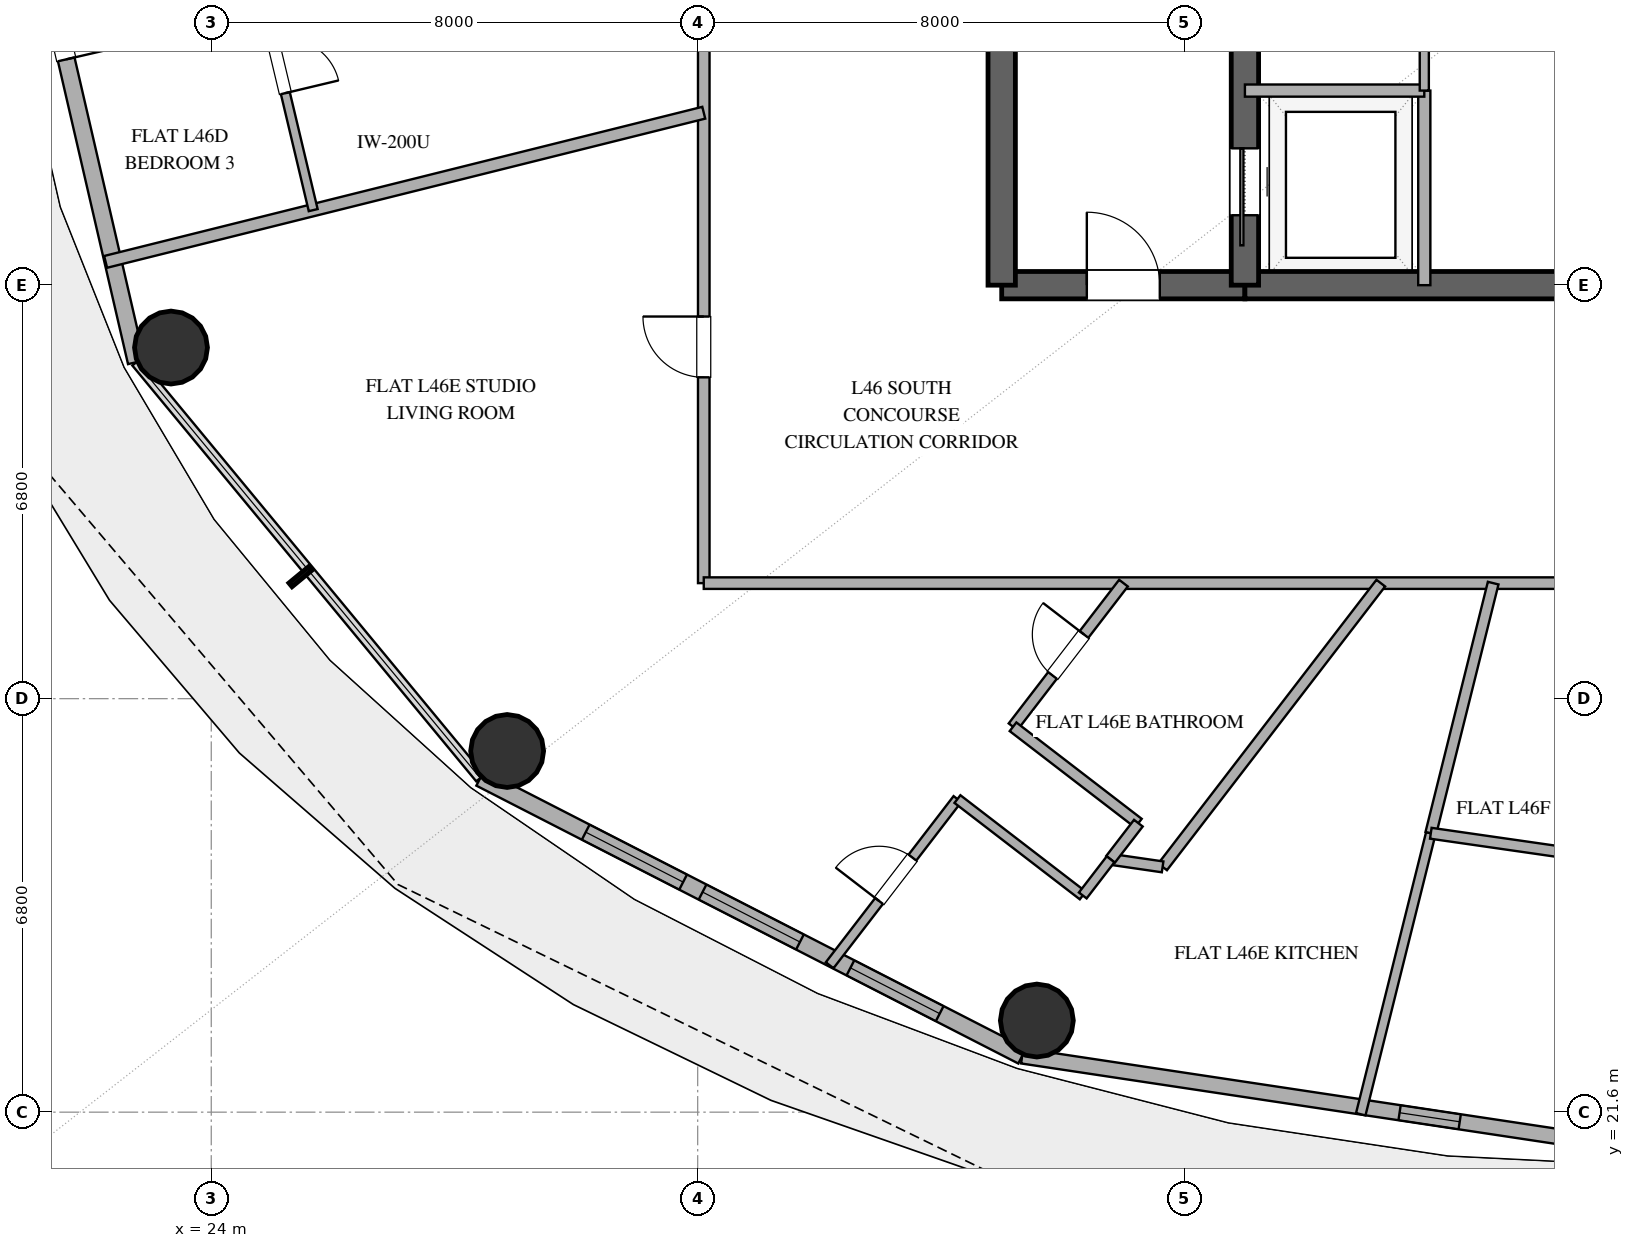
"""IFC4 building model, lengths in metres.
Left out: names, types, materials, properties, quantities, classifications, styles, units other than length and angle.
Written with IfcOpenShell. Run it as: python <this file> out.ifc"""

import sys

from ifc_helpers import new_model, si_unit, direction, frame, frame_2d, origin, origin_2d, place, context, subcontext, project, spatial, rectangle, hollow_circle, extrude, element, fill, save


model = new_model("IFC4")
c1 = context("Model", 3, precision=1e-05, world=origin(), true_north=direction((0.0, 1.0)))
c2 = subcontext(c1, "Body", "Model", "MODEL_VIEW")
j1 = project(units=[si_unit("LENGTHUNIT", "METRE"), si_unit("PLANEANGLEUNIT", "RADIAN")], contexts=[c1])
p1 = place(None, origin())
s1 = spatial("IfcSite", under=j1, at=p1, CompositionType="ELEMENT")
p2 = place(p1, origin())
s2 = spatial("IfcBuilding", under=s1, at=p2, CompositionType="ELEMENT")
p3 = place(p2, frame((0.0, 0.0, 183.0)))
s3 = spatial("IfcBuildingStorey", under=s2, at=p3, CompositionType="ELEMENT", Elevation=183.0)
p4 = place(p3, frame((37.0, 35.2, 0.0), z_axis=(0.0, 0.0, 1.0), x_axis=(1.0, 0.0, 0.0)))
e1 = element("IfcWall", 1, at=p4, inside=s3, PredefinedType="SHEAR", context=c2, shape_type="SweptSolid", body=[
    extrude(rectangle(XDim=4.0, YDim=0.45, at=frame_2d((2.0, 0.0))), origin(), (0.0, 0.0, 1.0), 3.38),
])
p5 = place(p4, frame((1.4, 0.0, 0.0)))
e2 = element("IfcOpeningElement", 2, at=p5, cuts=e1, PredefinedType="OPENING", context=c2, shape_type="SweptSolid", body=[
    extrude(rectangle(XDim=1.2, YDim=2.15, at=frame_2d((0.6, 1.075))), frame((0.0, 0.235, 0.0), z_axis=(0.0, -1.0, 0.0), x_axis=(1.0, 0.0, 0.0)), (0.0, 0.0, 1.0), 0.47),
])
p6 = place(p3, frame((41.0, 35.2, 0.0), z_axis=(0.0, 0.0, 1.0), x_axis=(1.0, 0.0, 0.0)))
e3 = element("IfcWall", 3, at=p6, inside=s3, PredefinedType="SHEAR", context=c2, shape_type="SweptSolid", body=[
    extrude(rectangle(XDim=14.0, YDim=0.45, at=frame_2d((7.0, 0.0))), origin(), (0.0, 0.0, 1.0), 3.38),
])
p7 = place(p6, frame((6.1, 0.0, 0.0)))
e4 = element("IfcOpeningElement", 4, at=p7, cuts=e3, PredefinedType="OPENING", context=c2, shape_type="SweptSolid", body=[
    extrude(rectangle(XDim=1.8, YDim=2.25, at=frame_2d((0.9, 1.125))), frame((0.0, 0.235, 0.0), z_axis=(0.0, -1.0, 0.0), x_axis=(1.0, 0.0, 0.0)), (0.0, 0.0, 1.0), 0.47),
])
p8 = place(p3, frame((37.0, 35.2, 0.0), z_axis=(0.0, 0.0, 1.0), x_axis=(0.0, 1.0, 0.0)))
e5 = element("IfcWall", 5, at=p8, inside=s3, PredefinedType="SHEAR", context=c2, shape_type="SweptSolid", body=[
    extrude(rectangle(XDim=13.6, YDim=0.45, at=frame_2d((6.8, 0.0))), origin(), (0.0, 0.0, 1.0), 3.38),
])
p9 = place(p3, frame((41.0, 35.2, 0.0), z_axis=(0.0, 0.0, 1.0), x_axis=(0.0, 1.0, 0.0)))
e6 = element("IfcWall", 6, at=p9, inside=s3, PredefinedType="SHEAR", context=c2, shape_type="SweptSolid", body=[
    extrude(rectangle(XDim=13.6, YDim=0.45, at=frame_2d((6.8, 0.0))), origin(), (0.0, 0.0, 1.0), 3.38),
])
p10 = place(p9, frame((1.15, 0.0, 0.0)))
e7 = element("IfcOpeningElement", 7, at=p10, cuts=e6, PredefinedType="OPENING", context=c2, shape_type="SweptSolid", body=[
    extrude(rectangle(XDim=1.1, YDim=2.2, at=frame_2d((0.55, 1.1))), frame((0.0, 0.235, 0.0), z_axis=(0.0, -1.0, 0.0), x_axis=(1.0, 0.0, 0.0)), (0.0, 0.0, 1.0), 0.47),
])
for number, where, z_axis, x_axis in (
    (8, (23.338, 34.174, 0.0), (0.0, 0.0, 1.0), (1.0, 0.0, 0.0)),
    (9, (28.866, 27.54, 0.0), (0.0, 0.0, 1.0), (1.0, 0.0, 0.0)),
    (10, (37.578, 23.107, 0.0), (0.0, 0.0, 1.0), (1.0, 0.0, 0.0)),
):
    element("IfcColumn", number, at=place(p3, frame(where, z_axis=z_axis, x_axis=x_axis)), inside=s3, PredefinedType="COLUMN", context=c2, shape_type="SweptSolid", body=[
        extrude(hollow_circle(Radius=0.6, WallThickness=0.032, at=origin_2d()), origin(), (0.0, 0.0, 1.0), 3.38),
    ])
p11 = place(p3, frame((20.901, 42.0, 0.0), z_axis=(0.0, 0.0, 1.0), x_axis=(0.225473184558, -0.974249374157, 0.0)))
e11 = element("IfcWall", 11, at=p11, inside=s3, PredefinedType="SOLIDWALL", context=c2, shape_type="SweptSolid", body=[
    extrude(rectangle(XDim=8.28, YDim=0.28, at=frame_2d((4.14, 0.0))), origin(), (0.0, 0.0, 1.0), 3.38),
])
p12 = place(p11, frame((1.568, 0.0, 0.0)))
e12 = element("IfcOpeningElement", 12, at=p12, cuts=e11, PredefinedType="OPENING", context=c2, shape_type="SweptSolid", body=[
    extrude(rectangle(XDim=1.6, YDim=2.25, at=frame_2d((0.8, 1.125))), frame((0.0, 0.15, 0.0), z_axis=(0.0, -1.0, 0.0), x_axis=(1.0, 0.0, 0.0)), (0.0, 0.0, 1.0), 0.3),
])
p13 = place(p3, frame((28.424, 27.094, 0.0), z_axis=(0.0, 0.0, 1.0), x_axis=(0.889872523182, -0.456209263919, 0.0)))
e13 = element("IfcWall", 13, at=p13, inside=s3, PredefinedType="SOLIDWALL", context=c2, shape_type="SweptSolid", body=[
    extrude(rectangle(XDim=10.016, YDim=0.28, at=frame_2d((5.008, 0.0))), origin(), (0.0, 0.0, 1.0), 3.38),
])
p14 = place(p13, frame((1.95, 0.0, 0.85)))
e14 = element("IfcOpeningElement", 14, at=p14, cuts=e13, PredefinedType="OPENING", context=c2, shape_type="SweptSolid", body=[
    extrude(rectangle(XDim=1.8, YDim=2.2, at=frame_2d((0.9, 1.1))), frame((0.0, 0.15, 0.0), z_axis=(0.0, -1.0, 0.0), x_axis=(1.0, 0.0, 0.0)), (0.0, 0.0, 1.0), 0.3),
])
p15 = place(p13, frame((4.109, 0.0, 0.85)))
e15 = element("IfcOpeningElement", 15, at=p15, cuts=e13, PredefinedType="OPENING", context=c2, shape_type="SweptSolid", body=[
    extrude(rectangle(XDim=1.8, YDim=2.2, at=frame_2d((0.9, 1.1))), frame((0.0, 0.15, 0.0), z_axis=(0.0, -1.0, 0.0), x_axis=(1.0, 0.0, 0.0)), (0.0, 0.0, 1.0), 0.3),
])
p16 = place(p13, frame((6.842, 0.0, 0.85)))
e16 = element("IfcOpeningElement", 16, at=p16, cuts=e13, PredefinedType="OPENING", context=c2, shape_type="SweptSolid", body=[
    extrude(rectangle(XDim=1.65, YDim=2.0, at=frame_2d((0.825, 1.0))), frame((0.0, 0.15, 0.0), z_axis=(0.0, -1.0, 0.0), x_axis=(1.0, 0.0, 0.0)), (0.0, 0.0, 1.0), 0.3),
])
p17 = place(p3, frame((37.337, 22.525, 0.0), z_axis=(0.0, 0.0, 1.0), x_axis=(0.988863993413, -0.148822049884, 0.0)))
e17 = element("IfcWall", 17, at=p17, inside=s3, PredefinedType="SOLIDWALL", context=c2, shape_type="SweptSolid", body=[
    extrude(rectangle(XDim=10.783, YDim=0.25, at=frame_2d((5.392, 0.0))), origin(), (0.0, 0.0, 1.0), 3.38),
])
p18 = place(p17, frame((6.276, 0.0, 0.35)))
e18 = element("IfcOpeningElement", 18, at=p18, cuts=e17, PredefinedType="OPENING", context=c2, shape_type="SweptSolid", body=[
    extrude(rectangle(XDim=1.0, YDim=1.05, at=frame_2d((0.5, 0.525))), frame((0.0, 0.135, 0.0), z_axis=(0.0, -1.0, 0.0), x_axis=(1.0, 0.0, 0.0)), (0.0, 0.0, 1.0), 0.27),
])
p19 = place(p3, frame((43.95, 35.2, 0.0), z_axis=(0.0, 0.0, 1.0), x_axis=(0.0, 1.0, 0.0)))
e19 = element("IfcWall", 19, at=p19, inside=s3, PredefinedType="SOLIDWALL", context=c2, shape_type="SweptSolid", body=[
    extrude(rectangle(XDim=3.2, YDim=0.2, at=frame_2d((1.6, 0.0))), origin(), (0.0, 0.0, 1.0), 2.74),
])
p20 = place(p3, frame((41.0, 38.4, 0.0), z_axis=(0.0, 0.0, 1.0), x_axis=(1.0, 0.0, 0.0)))
e20 = element("IfcWall", 20, at=p20, inside=s3, PredefinedType="SOLIDWALL", context=c2, shape_type="SweptSolid", body=[
    extrude(rectangle(XDim=2.95, YDim=0.2, at=frame_2d((1.475, 0.0))), origin(), (0.0, 0.0, 1.0), 2.74),
])
p21 = place(p3, frame((43.95, 38.4, 0.0), z_axis=(0.0, 0.0, 1.0), x_axis=(0.0, 1.0, 0.0)))
e21 = element("IfcWall", 21, at=p21, inside=s3, PredefinedType="PARTITIONING", context=c2, shape_type="SweptSolid", body=[
    extrude(rectangle(XDim=5.18, YDim=0.15, at=frame_2d((2.59, 0.0))), origin(), (0.0, 0.0, 1.0), 2.74),
])
p22 = place(p21, frame((2.1, 0.0, 0.0)))
e22 = element("IfcOpeningElement", 22, at=p22, cuts=e21, PredefinedType="OPENING", context=c2, shape_type="SweptSolid", body=[
    extrude(rectangle(XDim=0.9, YDim=2.15, at=frame_2d((0.45, 1.075))), frame((0.0, 0.085, 0.0), z_axis=(0.0, -1.0, 0.0), x_axis=(1.0, 0.0, 0.0)), (0.0, 0.0, 1.0), 0.17),
])
p23 = place(p3, frame((32.1, 30.3, 0.0), z_axis=(0.0, 0.0, 1.0), x_axis=(0.0, 1.0, 0.0)))
e23 = element("IfcWall", 23, at=p23, inside=s3, PredefinedType="PARTITIONING", context=c2, shape_type="SweptSolid", body=[
    extrude(rectangle(XDim=12.53, YDim=0.19, at=frame_2d((6.265, 0.0))), origin(), (0.0, 0.0, 1.0), 2.74),
])
p24 = place(p23, frame((3.384, 0.0, 0.0)))
e24 = element("IfcOpeningElement", 24, at=p24, cuts=e23, PredefinedType="OPENING", context=c2, shape_type="SweptSolid", body=[
    extrude(rectangle(XDim=1.0, YDim=2.2, at=frame_2d((0.5, 1.1))), frame((0.0, 0.105, 0.0), z_axis=(0.0, -1.0, 0.0), x_axis=(1.0, 0.0, 0.0)), (0.0, 0.0, 1.0), 0.21),
])
p25 = place(p3, frame((46.818, 30.3, 0.0), z_axis=(0.0, 0.0, 1.0), x_axis=(-1.0, 0.0, 0.0)))
e25 = element("IfcWall", 25, at=p25, inside=s3, PredefinedType="PARTITIONING", context=c2, shape_type="SweptSolid", body=[
    extrude(rectangle(XDim=14.718, YDim=0.19, at=frame_2d((7.359, 0.0))), origin(), (0.0, 0.0, 1.0), 2.74),
])
p26 = place(p3, frame((22.263, 35.583, 0.0), z_axis=(0.0, 0.0, 1.0), x_axis=(0.970298114693, 0.241912315983, 0.0)))
e26 = element("IfcWall", 26, at=p26, inside=s3, PredefinedType="PARTITIONING", context=c2, shape_type="SweptSolid", body=[
    extrude(rectangle(XDim=10.138, YDim=0.2, at=frame_2d((5.069, 0.0))), origin(), (0.0, 0.0, 1.0), 2.74),
])
p27 = place(p3, frame((39.646, 25.634, 0.0), z_axis=(0.0, 0.0, 1.0), x_axis=(0.609572446913, 0.792730365234, 0.0)))
e27 = element("IfcWall", 27, at=p27, inside=s3, PredefinedType="PLUMBINGWALL", context=c2, shape_type="SweptSolid", body=[
    extrude(rectangle(XDim=5.886, YDim=0.18, at=frame_2d((2.943, 0.0))), origin(), (0.0, 0.0, 1.0), 2.74),
])
p28 = place(p3, frame((24.552, 41.158, 0.0), z_axis=(0.0, 0.0, 1.0), x_axis=(0.231625058686, -0.972805135774, 0.0)))
e28 = element("IfcWall", 28, at=p28, inside=s3, PredefinedType="PARTITIONING", context=c2, shape_type="SweptSolid", body=[
    extrude(rectangle(XDim=4.856, YDim=0.15, at=frame_2d((2.428, 0.0))), origin(), (0.0, 0.0, 1.0), 2.74),
])
p29 = place(p28, frame((1.978, 0.0, 0.0)))
e29 = element("IfcOpeningElement", 29, at=p29, cuts=e28, PredefinedType="OPENING", context=c2, shape_type="SweptSolid", body=[
    extrude(rectangle(XDim=0.9, YDim=2.1, at=frame_2d((0.45, 1.05))), frame((0.0, 0.085, 0.0), z_axis=(0.0, -1.0, 0.0), x_axis=(1.0, 0.0, 0.0)), (0.0, 0.0, 1.0), 0.17),
])
p30 = place(p3, frame((42.905, 21.566, 0.0), z_axis=(0.0, 0.0, 1.0), x_axis=(0.24192039409, 0.970296100643, 0.0)))
e30 = element("IfcWall", 30, at=p30, inside=s3, PredefinedType="PLUMBINGWALL", context=c2, shape_type="SweptSolid", body=[
    extrude(rectangle(XDim=4.762, YDim=0.16, at=frame_2d((2.381, 0.0))), origin(), (0.0, 0.0, 1.0), 2.74),
])
p31 = place(p3, frame((44.057, 26.187, 0.0), z_axis=(0.0, 0.0, 1.0), x_axis=(0.241939344098, 0.97029137571, 0.0)))
e31 = element("IfcWall", 31, at=p31, inside=s3, PredefinedType="PLUMBINGWALL", context=c2, shape_type="SweptSolid", body=[
    extrude(rectangle(XDim=4.239, YDim=0.18, at=frame_2d((2.12, 0.0))), origin(), (0.0, 0.0, 1.0), 2.74),
])
p32 = place(p3, frame((48.0, 25.62, 0.0), z_axis=(0.0, 0.0, 1.0), x_axis=(-0.989829001183, 0.14226225226, 0.0)))
e32 = element("IfcWall", 32, at=p32, inside=s3, PredefinedType="PLUMBINGWALL", context=c2, shape_type="SweptSolid", body=[
    extrude(rectangle(XDim=3.983, YDim=0.18, at=frame_2d((1.992, 0.0))), origin(), (0.0, 0.0, 1.0), 2.74),
])
p33 = place(p3, frame((34.17, 24.016, 0.0), z_axis=(0.0, 0.0, 1.0), x_axis=(0.609597828201, 0.792710847568, 0.0)))
e33 = element("IfcWall", 33, at=p33, inside=s3, PredefinedType="PLUMBINGWALL", context=c2, shape_type="SweptSolid", body=[
    extrude(rectangle(XDim=3.448, YDim=0.16, at=frame_2d((1.724, 0.0))), origin(), (0.0, 0.0, 1.0), 2.74),
])
p34 = place(p33, frame((1.334, 0.0, 0.0)))
e34 = element("IfcOpeningElement", 34, at=p34, cuts=e33, PredefinedType="OPENING", context=c2, shape_type="SweptSolid", body=[
    extrude(rectangle(XDim=0.9, YDim=2.1, at=frame_2d((0.45, 1.05))), frame((0.0, 0.09, 0.0), z_axis=(0.0, -1.0, 0.0), x_axis=(1.0, 0.0, 0.0)), (0.0, 0.0, 1.0), 0.18),
])
p35 = place(p3, frame((37.186, 27.938, 0.0), z_axis=(0.0, 0.0, 1.0), x_axis=(0.609591964346, 0.792715356862, 0.0)))
e35 = element("IfcWall", 35, at=p35, inside=s3, PredefinedType="PLUMBINGWALL", context=c2, shape_type="SweptSolid", body=[
    extrude(rectangle(XDim=2.98, YDim=0.18, at=frame_2d((1.49, 0.0))), origin(), (0.0, 0.0, 1.0), 2.74),
])
p36 = place(p35, frame((1.065, 0.0, 0.0)))
e36 = element("IfcOpeningElement", 36, at=p36, cuts=e35, PredefinedType="OPENING", context=c2, shape_type="SweptSolid", body=[
    extrude(rectangle(XDim=0.85, YDim=2.1, at=frame_2d((0.425, 1.05))), frame((0.0, 0.1, 0.0), z_axis=(0.0, -1.0, 0.0), x_axis=(1.0, 0.0, 0.0)), (0.0, 0.0, 1.0), 0.2),
])
p37 = place(p3, frame((39.248, 26.353, 0.0), z_axis=(0.0, 0.0, 1.0), x_axis=(-0.792732166763, 0.609570104073, 0.0)))
e37 = element("IfcWall", 37, at=p37, inside=s3, PredefinedType="PLUMBINGWALL", context=c2, shape_type="SweptSolid", body=[
    extrude(rectangle(XDim=2.601, YDim=0.18, at=frame_2d((1.3, 0.0))), origin(), (0.0, 0.0, 1.0), 2.74),
])
p38 = place(p3, frame((36.272, 26.749, 0.0), z_axis=(0.0, 0.0, 1.0), x_axis=(0.792742649864, -0.609556470794, 0.0)))
e38 = element("IfcWall", 38, at=p38, inside=s3, PredefinedType="PLUMBINGWALL", context=c2, shape_type="SweptSolid", body=[
    extrude(rectangle(XDim=2.6, YDim=0.16, at=frame_2d((1.3, 0.0))), origin(), (0.0, 0.0, 1.0), 2.74),
])
p39 = place(p3, frame((38.791, 25.758, 0.0), z_axis=(0.0, 0.0, 1.0), x_axis=(0.989584977247, -0.143949896861, 0.0)))
e39 = element("IfcWall", 39, at=p39, inside=s3, PredefinedType="PLUMBINGWALL", context=c2, shape_type="SweptSolid", body=[
    extrude(rectangle(XDim=0.865, YDim=0.18, at=frame_2d((0.433, 0.0))), origin(), (0.0, 0.0, 1.0), 2.74),
])
p40 = place(p3, frame((38.791, 25.758, 0.0), z_axis=(0.0, 0.0, 1.0), x_axis=(0.609695029381, 0.792636089986, 0.0)))
e40 = element("IfcWall", 40, at=p40, inside=s3, PredefinedType="PLUMBINGWALL", context=c2, shape_type="SweptSolid", body=[
    extrude(rectangle(XDim=0.75, YDim=0.18, at=frame_2d((0.375, 0.0))), origin(), (0.0, 0.0, 1.0), 2.74),
])
p41 = place(p3, frame((38.333, 25.164, 0.0), z_axis=(0.0, 0.0, 1.0), x_axis=(0.609695029381, 0.792636089986, 0.0)))
e41 = element("IfcWall", 41, at=p41, inside=s3, PredefinedType="PLUMBINGWALL", context=c2, shape_type="SweptSolid", body=[
    extrude(rectangle(XDim=0.75, YDim=0.16, at=frame_2d((0.375, 0.0))), origin(), (0.0, 0.0, 1.0), 2.74),
])
p42 = place(p12, origin())
e42 = element("IfcDoor", 42, at=p42, inside=s3, OperationType="DOUBLE_DOOR_SINGLE_SWING", PredefinedType="DOOR", context=c2, shape_type="SweptSolid", body=[
    extrude(rectangle(XDim=1.6, YDim=2.25, at=frame_2d((0.8, 1.125))), frame((0.0, 0.025, 0.0), z_axis=(0.0, -1.0, 0.0), x_axis=(1.0, 0.0, 0.0)), (0.0, 0.0, 1.0), 0.05),
])
fill(e12, e42)
p43 = place(p14, origin())
e43 = element("IfcWindow", 43, at=p43, inside=s3, PartitioningType="SINGLE_PANEL", PredefinedType="WINDOW", context=c2, shape_type="SweptSolid", body=[
    extrude(rectangle(XDim=1.8, YDim=2.2, at=frame_2d((0.9, 1.1))), frame((0.0, 0.03, 0.0), z_axis=(0.0, -1.0, 0.0), x_axis=(1.0, 0.0, 0.0)), (0.0, 0.0, 1.0), 0.06),
])
fill(e14, e43)
p44 = place(p15, origin())
e44 = element("IfcWindow", 44, at=p44, inside=s3, PartitioningType="SINGLE_PANEL", PredefinedType="WINDOW", context=c2, shape_type="SweptSolid", body=[
    extrude(rectangle(XDim=1.8, YDim=2.2, at=frame_2d((0.9, 1.1))), frame((0.0, 0.03, 0.0), z_axis=(0.0, -1.0, 0.0), x_axis=(1.0, 0.0, 0.0)), (0.0, 0.0, 1.0), 0.06),
])
fill(e15, e44)
p45 = place(p16, origin())
e45 = element("IfcWindow", 45, at=p45, inside=s3, PartitioningType="SINGLE_PANEL", PredefinedType="WINDOW", context=c2, shape_type="SweptSolid", body=[
    extrude(rectangle(XDim=1.65, YDim=2.0, at=frame_2d((0.825, 1.0))), frame((0.0, 0.03, 0.0), z_axis=(0.0, -1.0, 0.0), x_axis=(1.0, 0.0, 0.0)), (0.0, 0.0, 1.0), 0.06),
])
fill(e16, e45)
p46 = place(p18, origin())
e46 = element("IfcWindow", 46, at=p46, inside=s3, PartitioningType="SINGLE_PANEL", PredefinedType="WINDOW", context=c2, shape_type="SweptSolid", body=[
    extrude(rectangle(XDim=1.0, YDim=1.05, at=frame_2d((0.5, 0.525))), frame((0.0, 0.03, 0.0), z_axis=(0.0, -1.0, 0.0), x_axis=(1.0, 0.0, 0.0)), (0.0, 0.0, 1.0), 0.06),
])
fill(e18, e46)
p47 = place(p10, origin())
e47 = element("IfcDoor", 47, at=p47, inside=s3, OperationType="SLIDING_TO_LEFT", PredefinedType="DOOR", context=c2, shape_type="SweptSolid", body=[
    extrude(rectangle(XDim=1.1, YDim=2.2, at=frame_2d((0.55, 1.1))), frame((0.0, 0.025, 0.0), z_axis=(0.0, -1.0, 0.0), x_axis=(1.0, 0.0, 0.0)), (0.0, 0.0, 1.0), 0.05),
])
fill(e7, e47)
p48 = place(p5, origin())
e48 = element("IfcDoor", 48, at=p48, inside=s3, OperationType="SINGLE_SWING_LEFT", PredefinedType="DOOR", context=c2, shape_type="SweptSolid", body=[
    extrude(rectangle(XDim=1.2, YDim=2.15, at=frame_2d((0.6, 1.075))), frame((0.0, 0.025, 0.0), z_axis=(0.0, -1.0, 0.0), x_axis=(1.0, 0.0, 0.0)), (0.0, 0.0, 1.0), 0.05),
])
fill(e2, e48)
p49 = place(p24, origin())
e49 = element("IfcDoor", 49, at=p49, inside=s3, OperationType="SINGLE_SWING_RIGHT", PredefinedType="DOOR", context=c2, shape_type="SweptSolid", body=[
    extrude(rectangle(XDim=1.0, YDim=2.2, at=frame_2d((0.5, 1.1))), frame((0.0, 0.025, 0.0), z_axis=(0.0, -1.0, 0.0), x_axis=(1.0, 0.0, 0.0)), (0.0, 0.0, 1.0), 0.05),
])
fill(e24, e49)
p50 = place(p29, origin())
e50 = element("IfcDoor", 50, at=p50, inside=s3, OperationType="SINGLE_SWING_RIGHT", PredefinedType="DOOR", context=c2, shape_type="SweptSolid", body=[
    extrude(rectangle(XDim=0.9, YDim=2.1, at=frame_2d((0.45, 1.05))), frame((0.0, 0.025, 0.0), z_axis=(0.0, -1.0, 0.0), x_axis=(1.0, 0.0, 0.0)), (0.0, 0.0, 1.0), 0.05),
])
fill(e29, e50)
p51 = place(p34, origin())
e51 = element("IfcDoor", 51, at=p51, inside=s3, OperationType="SINGLE_SWING_LEFT", PredefinedType="DOOR", context=c2, shape_type="SweptSolid", body=[
    extrude(rectangle(XDim=0.9, YDim=2.1, at=frame_2d((0.45, 1.05))), frame((0.0, 0.025, 0.0), z_axis=(0.0, -1.0, 0.0), x_axis=(1.0, 0.0, 0.0)), (0.0, 0.0, 1.0), 0.05),
])
fill(e34, e51)
p52 = place(p36, origin())
e52 = element("IfcDoor", 52, at=p52, inside=s3, OperationType="SINGLE_SWING_RIGHT", PredefinedType="DOOR", context=c2, shape_type="SweptSolid", body=[
    extrude(rectangle(XDim=0.85, YDim=2.1, at=frame_2d((0.425, 1.05))), frame((0.0, 0.025, 0.0), z_axis=(0.0, -1.0, 0.0), x_axis=(1.0, 0.0, 0.0)), (0.0, 0.0, 1.0), 0.05),
])
fill(e36, e52)
save(model, sys.argv[1])
